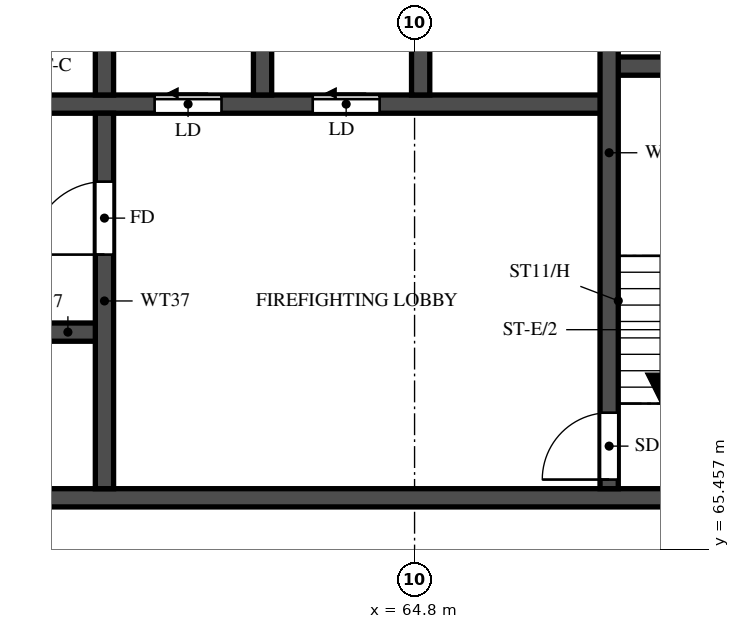
"""IFC4 building model, lengths in metres.
Left out: names, types, materials, properties, quantities, classifications, styles, units other than length and angle.
Written with IfcOpenShell. Run it as: python <this file> out.ifc"""

import sys

from ifc_helpers import new_model, si_unit, direction, frame, frame_2d, origin, place, context, subcontext, project, spatial, rectangle, extrude, element, fill, save


model = new_model("IFC4")
c1 = context("Model", 3, precision=1e-05, world=origin(), true_north=direction((0.0, 1.0)))
c2 = subcontext(c1, "Body", "Model", "MODEL_VIEW")
j1 = project(units=[si_unit("LENGTHUNIT", "METRE"), si_unit("PLANEANGLEUNIT", "RADIAN")], contexts=[c1])
p1 = place(None, origin())
s1 = spatial("IfcSite", under=j1, at=p1, CompositionType="ELEMENT")
p2 = place(p1, origin())
s2 = spatial("IfcBuilding", under=s1, at=p2, CompositionType="ELEMENT")
p3 = place(p2, frame((0.0, 0.0, 243.0)))
s3 = spatial("IfcBuildingStorey", under=s2, at=p3, CompositionType="ELEMENT", Elevation=243.0)
p4 = place(p3, frame((29.2, 66.3, 0.0), z_axis=(0.0, 0.0, 1.0), x_axis=(1.0, 0.0, 0.0)))
e1 = element("IfcWall", 1, at=p4, inside=s3, PredefinedType="SHEAR", context=c2, shape_type="SweptSolid", body=[
    extrude(rectangle(XDim=42.4, YDim=0.3, at=frame_2d((21.2, 0.0))), origin(), (0.0, 0.0, 1.0), 3.22),
])
p5 = place(p4, frame((1.425, 0.0, 0.0)))
e2 = element("IfcOpeningElement", 2, at=p5, cuts=e1, PredefinedType="OPENING", context=c2, shape_type="SweptSolid", body=[
    extrude(rectangle(XDim=1.1, YDim=2.1, at=frame_2d((0.55, 1.05))), frame((0.0, 0.16, 0.0), z_axis=(0.0, -1.0, 0.0), x_axis=(1.0, 0.0, 0.0)), (0.0, 0.0, 1.0), 0.32),
])
p6 = place(p4, frame((4.2, 0.0, 0.0)))
e3 = element("IfcOpeningElement", 3, at=p6, cuts=e1, PredefinedType="OPENING", context=c2, shape_type="SweptSolid", body=[
    extrude(rectangle(XDim=1.8, YDim=2.1, at=frame_2d((0.9, 1.05))), frame((0.0, 0.16, 0.0), z_axis=(0.0, -1.0, 0.0), x_axis=(1.0, 0.0, 0.0)), (0.0, 0.0, 1.0), 0.32),
])
p7 = place(p3, frame((35.65, 69.025, 0.0), z_axis=(0.0, 0.0, 1.0), x_axis=(1.0, 0.0, 0.0)))
e4 = element("IfcWall", 4, at=p7, inside=s3, PredefinedType="SHEAR", context=c2, shape_type="SweptSolid", body=[
    extrude(rectangle(XDim=24.05, YDim=0.3, at=frame_2d((12.025, 0.0))), origin(), (0.0, 0.0, 1.0), 3.22),
])
p8 = place(p7, frame((0.975, 0.0, 0.0)))
e5 = element("IfcOpeningElement", 5, at=p8, cuts=e4, PredefinedType="OPENING", context=c2, shape_type="SweptSolid", body=[
    extrude(rectangle(XDim=1.1, YDim=2.1, at=frame_2d((0.55, 1.05))), frame((0.0, 0.16, 0.0), z_axis=(0.0, -1.0, 0.0), x_axis=(1.0, 0.0, 0.0)), (0.0, 0.0, 1.0), 0.32),
])
p9 = place(p7, frame((3.725, 0.0, 0.0)))
e6 = element("IfcOpeningElement", 6, at=p9, cuts=e4, PredefinedType="OPENING", context=c2, shape_type="SweptSolid", body=[
    extrude(rectangle(XDim=1.1, YDim=2.1, at=frame_2d((0.55, 1.05))), frame((0.0, 0.16, 0.0), z_axis=(0.0, -1.0, 0.0), x_axis=(1.0, 0.0, 0.0)), (0.0, 0.0, 1.0), 0.32),
])
p10 = place(p7, frame((6.475, 0.0, 0.0)))
e7 = element("IfcOpeningElement", 7, at=p10, cuts=e4, PredefinedType="OPENING", context=c2, shape_type="SweptSolid", body=[
    extrude(rectangle(XDim=1.1, YDim=2.1, at=frame_2d((0.55, 1.05))), frame((0.0, 0.16, 0.0), z_axis=(0.0, -1.0, 0.0), x_axis=(1.0, 0.0, 0.0)), (0.0, 0.0, 1.0), 0.32),
])
p11 = place(p7, frame((9.225, 0.0, 0.0)))
e8 = element("IfcOpeningElement", 8, at=p11, cuts=e4, PredefinedType="OPENING", context=c2, shape_type="SweptSolid", body=[
    extrude(rectangle(XDim=1.1, YDim=2.1, at=frame_2d((0.55, 1.05))), frame((0.0, 0.16, 0.0), z_axis=(0.0, -1.0, 0.0), x_axis=(1.0, 0.0, 0.0)), (0.0, 0.0, 1.0), 0.32),
])
p12 = place(p7, frame((11.975, 0.0, 0.0)))
e9 = element("IfcOpeningElement", 9, at=p12, cuts=e4, PredefinedType="OPENING", context=c2, shape_type="SweptSolid", body=[
    extrude(rectangle(XDim=1.1, YDim=2.1, at=frame_2d((0.55, 1.05))), frame((0.0, 0.16, 0.0), z_axis=(0.0, -1.0, 0.0), x_axis=(1.0, 0.0, 0.0)), (0.0, 0.0, 1.0), 0.32),
])
p13 = place(p7, frame((14.725, 0.0, 0.0)))
e10 = element("IfcOpeningElement", 10, at=p13, cuts=e4, PredefinedType="OPENING", context=c2, shape_type="SweptSolid", body=[
    extrude(rectangle(XDim=1.1, YDim=2.1, at=frame_2d((0.55, 1.05))), frame((0.0, 0.16, 0.0), z_axis=(0.0, -1.0, 0.0), x_axis=(1.0, 0.0, 0.0)), (0.0, 0.0, 1.0), 0.32),
])
p14 = place(p7, frame((17.6, 0.0, 0.0)))
e11 = element("IfcOpeningElement", 11, at=p14, cuts=e4, PredefinedType="OPENING", context=c2, shape_type="SweptSolid", body=[
    extrude(rectangle(XDim=1.1, YDim=2.1, at=frame_2d((0.55, 1.05))), frame((0.0, 0.16, 0.0), z_axis=(0.0, -1.0, 0.0), x_axis=(1.0, 0.0, 0.0)), (0.0, 0.0, 1.0), 0.32),
])
p15 = place(p7, frame((20.6, 0.0, 0.0)))
e12 = element("IfcOpeningElement", 12, at=p15, cuts=e4, PredefinedType="OPENING", context=c2, shape_type="SweptSolid", body=[
    extrude(rectangle(XDim=1.1, YDim=2.1, at=frame_2d((0.55, 1.05))), frame((0.0, 0.16, 0.0), z_axis=(0.0, -1.0, 0.0), x_axis=(1.0, 0.0, 0.0)), (0.0, 0.0, 1.0), 0.32),
])
p16 = place(p3, frame((32.8, 72.775, 0.0), z_axis=(0.0, 0.0, 1.0), x_axis=(1.0, 0.0, 0.0)))
e13 = element("IfcWall", 13, at=p16, inside=s3, PredefinedType="SHEAR", context=c2, shape_type="SweptSolid", body=[
    extrude(rectangle(XDim=35.2, YDim=0.3, at=frame_2d((17.6, 0.0))), origin(), (0.0, 0.0, 1.0), 3.22),
])
p17 = place(p16, frame((19.8, 0.0, 0.0)))
e14 = element("IfcOpeningElement", 14, at=p17, cuts=e13, PredefinedType="OPENING", context=c2, shape_type="SweptSolid", body=[
    extrude(rectangle(XDim=1.1, YDim=2.1, at=frame_2d((0.55, 1.05))), frame((0.0, 0.16, 0.0), z_axis=(0.0, -1.0, 0.0), x_axis=(1.0, 0.0, 0.0)), (0.0, 0.0, 1.0), 0.32),
])
p18 = place(p16, frame((27.725, 0.0, 0.0)))
e15 = element("IfcOpeningElement", 15, at=p18, cuts=e13, PredefinedType="OPENING", context=c2, shape_type="SweptSolid", body=[
    extrude(rectangle(XDim=1.1, YDim=2.1, at=frame_2d((0.55, 1.05))), frame((0.0, 0.16, 0.0), z_axis=(0.0, -1.0, 0.0), x_axis=(1.0, 0.0, 0.0)), (0.0, 0.0, 1.0), 0.32),
])
p19 = place(p16, frame((30.325, 0.0, 0.0)))
e16 = element("IfcOpeningElement", 16, at=p19, cuts=e13, PredefinedType="OPENING", context=c2, shape_type="SweptSolid", body=[
    extrude(rectangle(XDim=1.1, YDim=2.1, at=frame_2d((0.55, 1.05))), frame((0.0, 0.16, 0.0), z_axis=(0.0, -1.0, 0.0), x_axis=(1.0, 0.0, 0.0)), (0.0, 0.0, 1.0), 0.32),
])
p20 = place(p16, frame((3.825, 0.0, 0.0)))
e17 = element("IfcOpeningElement", 17, at=p20, cuts=e13, PredefinedType="OPENING", context=c2, shape_type="SweptSolid", body=[
    extrude(rectangle(XDim=1.1, YDim=2.1, at=frame_2d((0.55, 1.05))), frame((0.0, 0.16, 0.0), z_axis=(0.0, -1.0, 0.0), x_axis=(1.0, 0.0, 0.0)), (0.0, 0.0, 1.0), 0.32),
])
p21 = place(p16, frame((6.575, 0.0, 0.0)))
e18 = element("IfcOpeningElement", 18, at=p21, cuts=e13, PredefinedType="OPENING", context=c2, shape_type="SweptSolid", body=[
    extrude(rectangle(XDim=1.1, YDim=2.1, at=frame_2d((0.55, 1.05))), frame((0.0, 0.16, 0.0), z_axis=(0.0, -1.0, 0.0), x_axis=(1.0, 0.0, 0.0)), (0.0, 0.0, 1.0), 0.32),
])
p22 = place(p16, frame((9.325, 0.0, 0.0)))
e19 = element("IfcOpeningElement", 19, at=p22, cuts=e13, PredefinedType="OPENING", context=c2, shape_type="SweptSolid", body=[
    extrude(rectangle(XDim=1.1, YDim=2.1, at=frame_2d((0.55, 1.05))), frame((0.0, 0.16, 0.0), z_axis=(0.0, -1.0, 0.0), x_axis=(1.0, 0.0, 0.0)), (0.0, 0.0, 1.0), 0.32),
])
p23 = place(p16, frame((12.075, 0.0, 0.0)))
e20 = element("IfcOpeningElement", 20, at=p23, cuts=e13, PredefinedType="OPENING", context=c2, shape_type="SweptSolid", body=[
    extrude(rectangle(XDim=1.1, YDim=2.1, at=frame_2d((0.55, 1.05))), frame((0.0, 0.16, 0.0), z_axis=(0.0, -1.0, 0.0), x_axis=(1.0, 0.0, 0.0)), (0.0, 0.0, 1.0), 0.32),
])
p24 = place(p16, frame((14.825, 0.0, 0.0)))
e21 = element("IfcOpeningElement", 21, at=p24, cuts=e13, PredefinedType="OPENING", context=c2, shape_type="SweptSolid", body=[
    extrude(rectangle(XDim=1.1, YDim=2.1, at=frame_2d((0.55, 1.05))), frame((0.0, 0.16, 0.0), z_axis=(0.0, -1.0, 0.0), x_axis=(1.0, 0.0, 0.0)), (0.0, 0.0, 1.0), 0.32),
])
p25 = place(p16, frame((17.575, 0.0, 0.0)))
e22 = element("IfcOpeningElement", 22, at=p25, cuts=e13, PredefinedType="OPENING", context=c2, shape_type="SweptSolid", body=[
    extrude(rectangle(XDim=1.1, YDim=2.1, at=frame_2d((0.55, 1.05))), frame((0.0, 0.16, 0.0), z_axis=(0.0, -1.0, 0.0), x_axis=(1.0, 0.0, 0.0)), (0.0, 0.0, 1.0), 0.32),
])
p26 = place(p16, frame((0.95, 0.0, 0.0)))
e23 = element("IfcOpeningElement", 23, at=p26, cuts=e13, PredefinedType="OPENING", context=c2, shape_type="SweptSolid", body=[
    extrude(rectangle(XDim=1.1, YDim=2.1, at=frame_2d((0.55, 1.05))), frame((0.0, 0.16, 0.0), z_axis=(0.0, -1.0, 0.0), x_axis=(1.0, 0.0, 0.0)), (0.0, 0.0, 1.0), 0.32),
])
p27 = place(p3, frame((68.0, 73.4, 0.0), z_axis=(0.0, 0.0, 1.0), x_axis=(1.0, 0.0, 0.0)))
e24 = element("IfcWall", 24, at=p27, inside=s3, PredefinedType="SHEAR", context=c2, shape_type="SweptSolid", body=[
    extrude(rectangle(XDim=3.1, YDim=0.3, at=frame_2d((1.55, 0.0))), origin(), (0.0, 0.0, 1.0), 3.22),
])
p28 = place(p3, frame((68.0, 66.45, 0.0), z_axis=(0.0, 0.0, 1.0), x_axis=(0.0, 1.0, 0.0)))
e25 = element("IfcWall", 25, at=p28, inside=s3, PredefinedType="SHEAR", context=c2, shape_type="SweptSolid", body=[
    extrude(rectangle(XDim=11.05, YDim=0.3, at=frame_2d((5.525, 0.0))), origin(), (0.0, 0.0, 1.0), 3.22),
])
p29 = place(p28, frame((0.15, 0.0, 0.0)))
e26 = element("IfcOpeningElement", 26, at=p29, cuts=e25, PredefinedType="OPENING", context=c2, shape_type="SweptSolid", body=[
    extrude(rectangle(XDim=1.1, YDim=2.1, at=frame_2d((0.55, 1.05))), frame((0.0, 0.16, 0.0), z_axis=(0.0, -1.0, 0.0), x_axis=(1.0, 0.0, 0.0)), (0.0, 0.0, 1.0), 0.32),
])
p30 = place(p3, frame((59.7, 66.45, 0.0), z_axis=(0.0, 0.0, 1.0), x_axis=(0.0, 1.0, 0.0)))
e27 = element("IfcWall", 27, at=p30, inside=s3, PredefinedType="SHEAR", context=c2, shape_type="SweptSolid", body=[
    extrude(rectangle(XDim=6.175, YDim=0.3, at=frame_2d((3.087, 0.0))), origin(), (0.0, 0.0, 1.0), 3.22),
])
p31 = place(p30, frame((3.85, 0.0, 0.0)))
e28 = element("IfcOpeningElement", 28, at=p31, cuts=e27, PredefinedType="OPENING", context=c2, shape_type="SweptSolid", body=[
    extrude(rectangle(XDim=1.2, YDim=2.1, at=frame_2d((0.6, 1.05))), frame((0.0, 0.16, 0.0), z_axis=(0.0, -1.0, 0.0), x_axis=(1.0, 0.0, 0.0)), (0.0, 0.0, 1.0), 0.32),
])
for number, where, z_axis, x_axis in (
    (29, (59.7, 72.925, 0.0), (0.0, 0.0, 1.0), (0.0, 1.0, 0.0)),
    (30, (62.3, 72.925, 0.0), (0.0, 0.0, 1.0), (0.0, 1.0, 0.0)),
    (31, (64.9, 72.925, 0.0), (0.0, 0.0, 1.0), (0.0, 1.0, 0.0)),
):
    element("IfcWall", number, at=place(p3, frame(where, z_axis=z_axis, x_axis=x_axis)), inside=s3, PredefinedType="SHEAR", context=c2, shape_type="SweptSolid", body=[
        extrude(rectangle(XDim=2.95, YDim=0.3, at=frame_2d((1.475, 0.0))), origin(), (0.0, 0.0, 1.0), 3.22),
    ])
p32 = place(p29, origin())
e32 = element("IfcDoor", 32, at=p32, inside=s3, OperationType="SINGLE_SWING_RIGHT", PredefinedType="DOOR", context=c2, shape_type="SweptSolid", body=[
    extrude(rectangle(XDim=1.1, YDim=2.1, at=frame_2d((0.55, 1.05))), frame((0.0, 0.025, 0.0), z_axis=(0.0, -1.0, 0.0), x_axis=(1.0, 0.0, 0.0)), (0.0, 0.0, 1.0), 0.05),
])
fill(e26, e32)
p33 = place(p31, origin())
e33 = element("IfcDoor", 33, at=p33, inside=s3, OperationType="SINGLE_SWING_LEFT", PredefinedType="DOOR", context=c2, shape_type="SweptSolid", body=[
    extrude(rectangle(XDim=1.2, YDim=2.1, at=frame_2d((0.6, 1.05))), frame((0.0, 0.025, 0.0), z_axis=(0.0, -1.0, 0.0), x_axis=(1.0, 0.0, 0.0)), (0.0, 0.0, 1.0), 0.05),
])
fill(e28, e33)
p34 = place(p18, origin())
e34 = element("IfcDoor", 34, at=p34, inside=s3, OperationType="SLIDING_TO_LEFT", PredefinedType="DOOR", context=c2, shape_type="SweptSolid", body=[
    extrude(rectangle(XDim=1.1, YDim=2.1, at=frame_2d((0.55, 1.05))), frame((0.0, 0.025, 0.0), z_axis=(0.0, -1.0, 0.0), x_axis=(1.0, 0.0, 0.0)), (0.0, 0.0, 1.0), 0.05),
])
fill(e15, e34)
p35 = place(p19, origin())
e35 = element("IfcDoor", 35, at=p35, inside=s3, OperationType="SLIDING_TO_LEFT", PredefinedType="DOOR", context=c2, shape_type="SweptSolid", body=[
    extrude(rectangle(XDim=1.1, YDim=2.1, at=frame_2d((0.55, 1.05))), frame((0.0, 0.025, 0.0), z_axis=(0.0, -1.0, 0.0), x_axis=(1.0, 0.0, 0.0)), (0.0, 0.0, 1.0), 0.05),
])
fill(e16, e35)
save(model, sys.argv[1])
